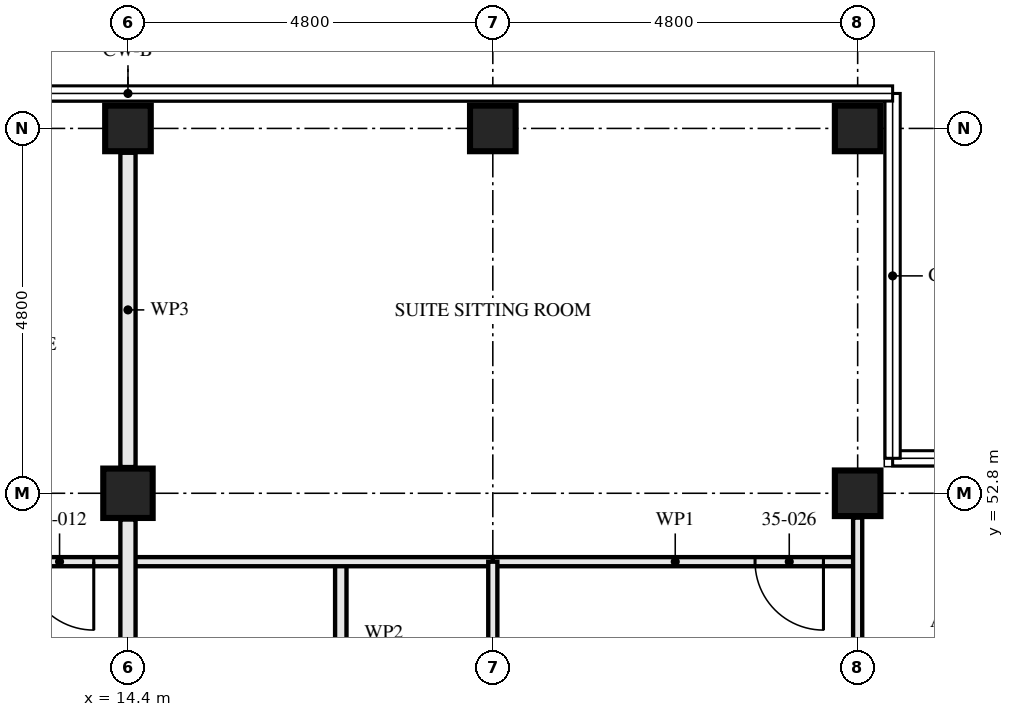
"""IFC4 building model, lengths in metres.
Left out: names, types, materials, properties, quantities, classifications, styles, units other than length and angle.
Written with IfcOpenShell. Run it as: python <this file> out.ifc"""

import sys

from ifc_helpers import new_model, si_unit, direction, frame, frame_2d, origin, origin_2d, place, context, subcontext, project, spatial, rectangle, hollow_rectangle, extrude, element, fill, save


model = new_model("IFC4")
c1 = context("Model", 3, precision=1e-05, world=origin(), true_north=direction((0.0, 1.0)))
c2 = subcontext(c1, "Body", "Model", "MODEL_VIEW")
j1 = project(units=[si_unit("LENGTHUNIT", "METRE"), si_unit("PLANEANGLEUNIT", "RADIAN")], contexts=[c1])
p1 = place(None, origin())
s1 = spatial("IfcSite", under=j1, at=p1, CompositionType="ELEMENT")
p2 = place(p1, origin())
s2 = spatial("IfcBuilding", under=s1, at=p2, CompositionType="ELEMENT")
p3 = place(p2, frame((0.0, 0.0, 129.5)))
s3 = spatial("IfcBuildingStorey", under=s2, at=p3, CompositionType="ELEMENT", Elevation=129.5)
p4 = place(p3, frame((14.4, 52.8, 0.0), z_axis=(0.0, 0.0, 1.0), x_axis=(1.0, 0.0, 0.0)))
e1 = element("IfcColumn", 1, at=p4, inside=s3, PredefinedType="COLUMN", context=c2, shape_type="SweptSolid", body=[
    extrude(hollow_rectangle(XDim=0.65, YDim=0.65, WallThickness=0.05, at=origin_2d()), origin(), (0.0, 0.0, 1.0), 3.5),
])
for number, where, z_axis, x_axis in (
    (2, (14.4, 57.6, 0.0), (0.0, 0.0, 1.0), (0.0, 1.0, 0.0)),
    (3, (19.2, 57.6, 0.0), (0.0, 0.0, 1.0), (0.0, 1.0, 0.0)),
    (4, (24.0, 52.8, 0.0), (0.0, 0.0, 1.0), (0.0, 1.0, 0.0)),
    (5, (24.0, 57.6, 0.0), (0.0, 0.0, 1.0), (0.0, 1.0, 0.0)),
):
    element("IfcColumn", number, at=place(p3, frame(where, z_axis=z_axis, x_axis=x_axis)), inside=s3, PredefinedType="COLUMN", context=c2, shape_type="SweptSolid", body=[
        extrude(hollow_rectangle(XDim=0.6, YDim=0.6, WallThickness=0.08, at=origin_2d()), origin(), (0.0, 0.0, 1.0), 3.5),
    ])
p5 = place(p3, frame((14.4, 51.9, 0.0), z_axis=(0.0, 0.0, 1.0), x_axis=(-1.0, 0.0, 0.0)))
e6 = element("IfcWall", 6, at=p5, inside=s3, PredefinedType="PARTITIONING", context=c2, shape_type="SweptSolid", body=[
    extrude(rectangle(XDim=4.8, YDim=0.12, at=frame_2d((2.4, 0.0))), origin(), (0.0, 0.0, 1.0), 3.33),
])
p6 = place(p5, frame((0.45, 0.0, 0.0)))
e7 = element("IfcOpeningElement", 7, at=p6, cuts=e6, PredefinedType="OPENING", context=c2, shape_type="SweptSolid", body=[
    extrude(rectangle(XDim=0.9, YDim=2.1, at=frame_2d((0.45, 1.05))), frame((0.0, 0.071, 0.0), z_axis=(0.0, -1.0, 0.0), x_axis=(1.0, 0.0, 0.0)), (0.0, 0.0, 1.0), 0.141),
])
p7 = place(p5, frame((2.925, 0.0, 0.0)))
e8 = element("IfcOpeningElement", 8, at=p7, cuts=e6, PredefinedType="OPENING", context=c2, shape_type="SweptSolid", body=[
    extrude(rectangle(XDim=0.95, YDim=2.1, at=frame_2d((0.475, 1.05))), frame((0.0, 0.071, 0.0), z_axis=(0.0, -1.0, 0.0), x_axis=(1.0, 0.0, 0.0)), (0.0, 0.0, 1.0), 0.141),
])
p8 = place(p3, frame((17.2, 51.9, 0.0), z_axis=(0.0, 0.0, 1.0), x_axis=(0.0, -1.0, 0.0)))
e9 = element("IfcWall", 9, at=p8, inside=s3, PredefinedType="PARTITIONING", context=c2, shape_type="SweptSolid", body=[
    extrude(rectangle(XDim=3.0, YDim=0.15, at=frame_2d((1.5, 0.0))), origin(), (0.0, 0.0, 1.0), 3.33),
])
p9 = place(p8, frame((1.05, 0.0, 0.0)))
e10 = element("IfcOpeningElement", 10, at=p9, cuts=e9, PredefinedType="OPENING", context=c2, shape_type="SweptSolid", body=[
    extrude(rectangle(XDim=0.9, YDim=2.1, at=frame_2d((0.45, 1.05))), frame((0.0, 0.085, 0.0), z_axis=(0.0, -1.0, 0.0), x_axis=(1.0, 0.0, 0.0)), (0.0, 0.0, 1.0), 0.171),
])
p10 = place(p3, frame((19.2, 51.9, 0.0), z_axis=(0.0, 0.0, 1.0), x_axis=(0.0, -1.0, 0.0)))
e11 = element("IfcWall", 11, at=p10, inside=s3, PredefinedType="PARTITIONING", context=c2, shape_type="SweptSolid", body=[
    extrude(rectangle(XDim=6.15, YDim=0.12, at=frame_2d((3.075, 0.0))), origin(), (0.0, 0.0, 1.0), 2.55),
])
p11 = place(p10, frame((2.625, 0.0, 0.0)))
e12 = element("IfcOpeningElement", 12, at=p11, cuts=e11, PredefinedType="OPENING", context=c2, shape_type="SweptSolid", body=[
    extrude(rectangle(XDim=0.9, YDim=2.1, at=frame_2d((0.45, 1.05))), frame((0.0, 0.071, 0.0), z_axis=(0.0, -1.0, 0.0), x_axis=(1.0, 0.0, 0.0)), (0.0, 0.0, 1.0), 0.141),
])
p12 = place(p3, frame((24.0, 51.9, 0.0), z_axis=(0.0, 0.0, 1.0), x_axis=(-1.0, 0.0, 0.0)))
e13 = element("IfcWall", 13, at=p12, inside=s3, PredefinedType="PARTITIONING", context=c2, shape_type="SweptSolid", body=[
    extrude(rectangle(XDim=4.8, YDim=0.12, at=frame_2d((2.4, 0.0))), origin(), (0.0, 0.0, 1.0), 3.33),
])
p13 = place(p12, frame((0.45, 0.0, 0.0)))
e14 = element("IfcOpeningElement", 14, at=p13, cuts=e13, PredefinedType="OPENING", context=c2, shape_type="SweptSolid", body=[
    extrude(rectangle(XDim=0.9, YDim=2.1, at=frame_2d((0.45, 1.05))), frame((0.0, 0.071, 0.0), z_axis=(0.0, -1.0, 0.0), x_axis=(1.0, 0.0, 0.0)), (0.0, 0.0, 1.0), 0.141),
])
p14 = place(p3, frame((19.2, 51.9, 0.0), z_axis=(0.0, 0.0, 1.0), x_axis=(-1.0, 0.0, 0.0)))
e15 = element("IfcWall", 15, at=p14, inside=s3, PredefinedType="PARTITIONING", context=c2, shape_type="SweptSolid", body=[
    extrude(rectangle(XDim=4.8, YDim=0.12, at=frame_2d((2.4, 0.0))), origin(), (0.0, 0.0, 1.0), 3.33),
])
p15 = place(p3, frame((24.0, 52.48, 0.0), z_axis=(0.0, 0.0, 1.0), x_axis=(0.0, -1.0, 0.0)))
e16 = element("IfcWall", 16, at=p15, inside=s3, PredefinedType="PARTITIONING", context=c2, shape_type="SweptSolid", body=[
    extrude(rectangle(XDim=3.68, YDim=0.12, at=frame_2d((1.84, 0.0))), origin(), (0.0, 0.0, 1.0), 3.33),
])
p16 = place(p15, frame((1.63, 0.0, 0.0)))
e17 = element("IfcOpeningElement", 17, at=p16, cuts=e16, PredefinedType="OPENING", context=c2, shape_type="SweptSolid", body=[
    extrude(rectangle(XDim=0.9, YDim=2.1, at=frame_2d((0.45, 1.05))), frame((0.0, 0.071, 0.0), z_axis=(0.0, -1.0, 0.0), x_axis=(1.0, 0.0, 0.0)), (0.0, 0.0, 1.0), 0.141),
])
p17 = place(p3, frame((14.4, 48.345, 0.0), z_axis=(0.0, 0.0, 1.0), x_axis=(0.0, 1.0, 0.0)))
e18 = element("IfcWall", 18, at=p17, inside=s3, PredefinedType="PARTITIONING", context=c2, shape_type="SweptSolid", body=[
    extrude(rectangle(XDim=4.11, YDim=0.2, at=frame_2d((2.055, 0.0))), origin(), (0.0, 0.0, 1.0), 2.32),
])
p18 = place(p3, frame((14.4, 53.145, 0.0), z_axis=(0.0, 0.0, 1.0), x_axis=(0.0, 1.0, 0.0)))
e19 = element("IfcWall", 19, at=p18, inside=s3, PredefinedType="PARTITIONING", context=c2, shape_type="SweptSolid", body=[
    extrude(rectangle(XDim=4.135, YDim=0.2, at=frame_2d((2.067, 0.0))), origin(), (0.0, 0.0, 1.0), 2.32),
])
p19 = place(p6, origin())
e20 = element("IfcDoor", 20, at=p19, inside=s3, OperationType="SINGLE_SWING_RIGHT", PredefinedType="DOOR", context=c2, shape_type="SweptSolid", body=[
    extrude(rectangle(XDim=0.9, YDim=2.1, at=frame_2d((0.45, 1.05))), frame((0.0, 0.022, 0.0), z_axis=(0.0, -1.0, 0.0), x_axis=(1.0, 0.0, 0.0)), (0.0, 0.0, 1.0), 0.044),
])
fill(e7, e20)
p20 = place(p13, origin())
e21 = element("IfcDoor", 21, at=p20, inside=s3, OperationType="SINGLE_SWING_RIGHT", PredefinedType="DOOR", context=c2, shape_type="SweptSolid", body=[
    extrude(rectangle(XDim=0.9, YDim=2.1, at=frame_2d((0.45, 1.05))), frame((0.0, 0.022, 0.0), z_axis=(0.0, -1.0, 0.0), x_axis=(1.0, 0.0, 0.0)), (0.0, 0.0, 1.0), 0.044),
])
fill(e14, e21)
save(model, sys.argv[1])
